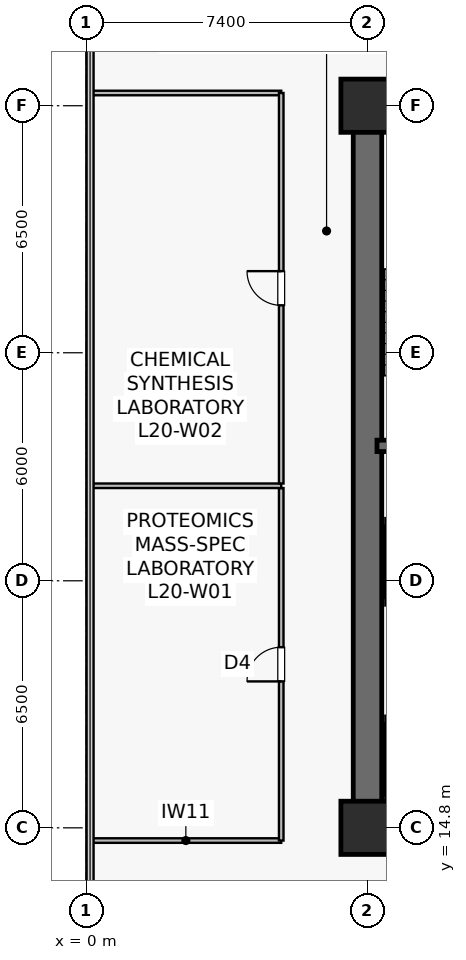
"""IFC4 building model, lengths in metres.
Left out: names, types, materials, properties, quantities, classifications, styles, units other than length and angle.
Written with IfcOpenShell. Run it as: python <this file> out.ifc"""

import sys

from ifc_helpers import new_model, si_unit, direction, frame, frame_2d, origin, origin_2d, place, context, subcontext, project, spatial, rectangle, extrude, source, transform, mapped, element, fill, save


model = new_model("IFC4")
c1 = context("Model", 3, precision=1e-05, world=origin(), true_north=direction((0.0, 1.0)))
c2 = subcontext(c1, "Body", "Model", "MODEL_VIEW")
j1 = project(units=[si_unit("LENGTHUNIT", "METRE"), si_unit("PLANEANGLEUNIT", "RADIAN")], contexts=[c1])
p1 = place(None, origin())
s1 = spatial("IfcSite", under=j1, at=p1, CompositionType="ELEMENT")
p2 = place(p1, origin())
s2 = spatial("IfcBuilding", under=s1, at=p2, CompositionType="ELEMENT")
p3 = place(p2, frame((0.0, 0.0, 82.6)))
s3 = spatial("IfcBuildingStorey", under=s2, at=p3, CompositionType="ELEMENT", Elevation=82.6)
p4 = place(p3, frame((7.025, 14.8, 0.0), z_axis=(0.0, 0.0, 1.0), x_axis=(1.0, 0.0, 0.0)))
e1 = element("IfcWall", 1, at=p4, inside=s3, PredefinedType="SHEAR", context=c2, shape_type="SweptSolid", body=[
    extrude(rectangle(XDim=15.55, YDim=0.75, at=frame_2d((7.775, 0.0))), origin(), (0.0, 0.0, 1.0), 3.78),
])
p5 = place(p3, frame((7.025, 33.8, 0.0), z_axis=(0.0, 0.0, 1.0), x_axis=(1.0, 0.0, 0.0)))
e2 = element("IfcWall", 2, at=p5, inside=s3, PredefinedType="SHEAR", context=c2, shape_type="SweptSolid", body=[
    extrude(rectangle(XDim=15.55, YDim=0.75, at=frame_2d((7.775, 0.0))), origin(), (0.0, 0.0, 1.0), 3.78),
])
p6 = place(p5, frame((5.3, 0.0, 0.0)))
e3 = element("IfcOpeningElement", 3, at=p6, cuts=e2, PredefinedType="OPENING", context=c2, shape_type="SweptSolid", body=[
    extrude(rectangle(XDim=0.95, YDim=2.15, at=frame_2d((0.475, 1.075))), frame((0.0, 0.385, 0.0), z_axis=(0.0, -1.0, 0.0), x_axis=(1.0, 0.0, 0.0)), (0.0, 0.0, 1.0), 0.77),
])
p7 = place(p5, frame((7.815, 0.0, 0.0)))
e4 = element("IfcOpeningElement", 4, at=p7, cuts=e2, PredefinedType="OPENING", context=c2, shape_type="SweptSolid", body=[
    extrude(rectangle(XDim=0.95, YDim=2.15, at=frame_2d((0.475, 1.075))), frame((0.0, 0.385, 0.0), z_axis=(0.0, -1.0, 0.0), x_axis=(1.0, 0.0, 0.0)), (0.0, 0.0, 1.0), 0.77),
])
p8 = place(p5, frame((10.365, 0.0, 0.0)))
e5 = element("IfcOpeningElement", 5, at=p8, cuts=e2, PredefinedType="OPENING", context=c2, shape_type="SweptSolid", body=[
    extrude(rectangle(XDim=0.95, YDim=2.15, at=frame_2d((0.475, 1.075))), frame((0.0, 0.385, 0.0), z_axis=(0.0, -1.0, 0.0), x_axis=(1.0, 0.0, 0.0)), (0.0, 0.0, 1.0), 0.77),
])
p9 = place(p5, frame((12.915, 0.0, 0.0)))
e6 = element("IfcOpeningElement", 6, at=p9, cuts=e2, PredefinedType="OPENING", context=c2, shape_type="SweptSolid", body=[
    extrude(rectangle(XDim=0.95, YDim=2.15, at=frame_2d((0.475, 1.075))), frame((0.0, 0.385, 0.0), z_axis=(0.0, -1.0, 0.0), x_axis=(1.0, 0.0, 0.0)), (0.0, 0.0, 1.0), 0.77),
])
p10 = place(p3, frame((7.4, 15.175, 0.0), z_axis=(0.0, 0.0, 1.0), x_axis=(0.0, 1.0, 0.0)))
e7 = element("IfcWall", 7, at=p10, inside=s3, PredefinedType="SHEAR", context=c2, shape_type="SweptSolid", body=[
    extrude(rectangle(XDim=18.25, YDim=0.75, at=frame_2d((9.125, 0.0))), origin(), (0.0, 0.0, 1.0), 3.78),
])
p11 = place(p3, frame((7.65, 24.85, 0.0), z_axis=(0.0, 0.0, 1.0), x_axis=(1.0, 0.0, 0.0)))
e8 = element("IfcWall", 8, at=p11, inside=s3, PredefinedType="SHEAR", context=c2, shape_type="SweptSolid", body=[
    extrude(rectangle(XDim=3.8, YDim=0.3, at=frame_2d((1.9, 0.0))), origin(), (0.0, 0.0, 1.0), 3.78),
])
p12 = place(p3, frame((7.73, 33.4, 0.0), z_axis=(0.0, 0.0, 1.0), x_axis=(1.0, 0.0, 0.0)))
e9 = element("IfcWall", 9, at=p12, inside=s3, PredefinedType="SOLIDWALL", context=c2, shape_type="SweptSolid", body=[
    extrude(rectangle(XDim=3.72, YDim=0.12, at=frame_2d((1.86, 0.0))), origin(), (0.0, 0.0, 1.0), 3.78),
])
m1 = source(origin(), c2, "Body", "SweptSolid", [
    extrude(rectangle(XDim=1.4, YDim=1.4, at=origin_2d()), origin(), (0.0, 0.0, 1.0), 4.1),
])
for number, where, z_axis, x_axis in (
    (10, (7.4, 14.8, 0.0), (0.0, 0.0, 1.0), (1.0, 0.0, 0.0)),
    (11, (7.4, 33.8, 0.0), (0.0, 0.0, 1.0), (1.0, 0.0, 0.0)),
):
    element("IfcColumn", number, at=place(p3, frame(where, z_axis=z_axis, x_axis=x_axis)), inside=s3, PredefinedType="COLUMN", context=c2, shape_type="MappedRepresentation", body=[
        mapped(m1, transform((0.0, 0.0, 0.0), scale=1.0)),
    ])
p13 = place(p3, frame((7.87, 17.65, 0.0), z_axis=(0.0, 0.0, 1.0), x_axis=(1.0, 0.0, 0.0)))
e12 = element("IfcWall", 12, at=p13, inside=s3, PredefinedType="SOLIDWALL", context=c2, shape_type="SweptSolid", body=[
    extrude(rectangle(XDim=2.26, YDim=0.2, at=frame_2d((1.13, 0.0))), origin(), (0.0, 0.0, 1.0), 3.78),
])
p14 = place(p13, frame((0.58, 0.0, 0.0)))
e13 = element("IfcOpeningElement", 13, at=p14, cuts=e12, PredefinedType="OPENING", context=c2, shape_type="SweptSolid", body=[
    extrude(rectangle(XDim=1.1, YDim=2.22, at=frame_2d((0.55, 1.11))), frame((0.0, 0.11, 0.0), z_axis=(0.0, -1.0, 0.0), x_axis=(1.0, 0.0, 0.0)), (0.0, 0.0, 1.0), 0.22),
])
p15 = place(p3, frame((7.87, 15.55, 0.0), z_axis=(0.0, 0.0, 1.0), x_axis=(1.0, 0.0, 0.0)))
e14 = element("IfcWall", 14, at=p15, inside=s3, PredefinedType="SOLIDWALL", context=c2, shape_type="SweptSolid", body=[
    extrude(rectangle(XDim=2.26, YDim=0.2, at=frame_2d((1.13, 0.0))), origin(), (0.0, 0.0, 1.0), 3.78),
])
p16 = place(p3, frame((7.95, 15.65, 0.0), z_axis=(0.0, 0.0, 1.0), x_axis=(0.0, 1.0, 0.0)))
e15 = element("IfcWall", 15, at=p16, inside=s3, PredefinedType="SOLIDWALL", context=c2, shape_type="SweptSolid", body=[
    extrude(rectangle(XDim=1.9, YDim=0.18, at=frame_2d((0.95, 0.0))), origin(), (0.0, 0.0, 1.0), 3.78),
])
for number, where, z_axis, x_axis in (
    (16, (7.87, 20.75, 0.0), (0.0, 0.0, 1.0), (1.0, 0.0, 0.0)),
    (17, (7.87, 22.85, 0.0), (0.0, 0.0, 1.0), (1.0, 0.0, 0.0)),
):
    element("IfcWall", number, at=place(p3, frame(where, z_axis=z_axis, x_axis=x_axis)), inside=s3, PredefinedType="SOLIDWALL", context=c2, shape_type="SweptSolid", body=[
        extrude(rectangle(XDim=2.26, YDim=0.2, at=frame_2d((1.13, 0.0))), origin(), (0.0, 0.0, 1.0), 3.78),
    ])
p17 = place(p3, frame((7.95, 20.85, 0.0), z_axis=(0.0, 0.0, 1.0), x_axis=(0.0, 1.0, 0.0)))
e18 = element("IfcWall", 18, at=p17, inside=s3, PredefinedType="SOLIDWALL", context=c2, shape_type="SweptSolid", body=[
    extrude(rectangle(XDim=1.9, YDim=0.18, at=frame_2d((0.95, 0.0))), origin(), (0.0, 0.0, 1.0), 3.78),
])
for number, where, z_axis, x_axis in (
    (19, (0.11, 14.465, 0.0), (0.0, 0.0, 1.0), (1.0, 0.0, 0.0)),
    (20, (0.11, 34.135, 0.0), (0.0, 0.0, 1.0), (1.0, 0.0, 0.0)),
):
    element("IfcWall", number, at=place(p3, frame(where, z_axis=z_axis, x_axis=x_axis)), inside=s3, PredefinedType="PARTITIONING", context=c2, shape_type="SweptSolid", body=[
        extrude(rectangle(XDim=5.02, YDim=0.12, at=frame_2d((2.51, 0.0))), origin(), (0.0, 0.0, 1.0), 3.78),
    ])
p18 = place(p3, frame((5.13, 14.465, 0.0), z_axis=(0.0, 0.0, 1.0), x_axis=(0.0, 1.0, 0.0)))
e21 = element("IfcWall", 21, at=p18, inside=s3, PredefinedType="PARTITIONING", context=c2, shape_type="SweptSolid", body=[
    extrude(rectangle(XDim=9.275, YDim=0.12, at=frame_2d((4.637, 0.0))), origin(), (0.0, 0.0, 1.0), 3.78),
])
p19 = place(p18, frame((4.188, 0.0, 0.0)))
e22 = element("IfcOpeningElement", 22, at=p19, cuts=e21, PredefinedType="OPENING", context=c2, shape_type="SweptSolid", body=[
    extrude(rectangle(XDim=0.9, YDim=2.1, at=frame_2d((0.45, 1.05))), frame((0.0, 0.07, 0.0), z_axis=(0.0, -1.0, 0.0), x_axis=(1.0, 0.0, 0.0)), (0.0, 0.0, 1.0), 0.14),
])
p20 = place(p3, frame((0.11, 23.8, 0.0), z_axis=(0.0, 0.0, 1.0), x_axis=(1.0, 0.0, 0.0)))
e23 = element("IfcWall", 23, at=p20, inside=s3, PredefinedType="PARTITIONING", context=c2, shape_type="SweptSolid", body=[
    extrude(rectangle(XDim=5.02, YDim=0.12, at=frame_2d((2.51, 0.0))), origin(), (0.0, 0.0, 1.0), 3.78),
])
p21 = place(p3, frame((5.13, 23.86, 0.0), z_axis=(0.0, 0.0, 1.0), x_axis=(0.0, 1.0, 0.0)))
e24 = element("IfcWall", 24, at=p21, inside=s3, PredefinedType="PARTITIONING", context=c2, shape_type="SweptSolid", body=[
    extrude(rectangle(XDim=10.275, YDim=0.12, at=frame_2d((5.137, 0.0))), origin(), (0.0, 0.0, 1.0), 3.78),
])
p22 = place(p21, frame((4.688, 0.0, 0.0)))
e25 = element("IfcOpeningElement", 25, at=p22, cuts=e24, PredefinedType="OPENING", context=c2, shape_type="SweptSolid", body=[
    extrude(rectangle(XDim=0.9, YDim=2.1, at=frame_2d((0.45, 1.05))), frame((0.0, 0.07, 0.0), z_axis=(0.0, -1.0, 0.0), x_axis=(1.0, 0.0, 0.0)), (0.0, 0.0, 1.0), 0.14),
])
m2 = source(origin(), c2, "Body", "SweptSolid", [
    extrude(rectangle(XDim=0.9, YDim=2.1, at=frame_2d((0.45, 1.05))), frame((0.0, 0.025, 0.0), z_axis=(0.0, -1.0, 0.0), x_axis=(1.0, 0.0, 0.0)), (0.0, 0.0, 1.0), 0.05),
])
p23 = place(p19, origin())
e26 = element("IfcDoor", 26, at=p23, inside=s3, OperationType="SINGLE_SWING_LEFT", PredefinedType="DOOR", context=c2, shape_type="MappedRepresentation", body=[
    mapped(m2, transform((0.0, 0.0, 0.0), scale=1.0)),
])
fill(e22, e26)
p24 = place(p22, origin())
e27 = element("IfcDoor", 27, at=p24, inside=s3, OperationType="SINGLE_SWING_RIGHT", PredefinedType="DOOR", context=c2, shape_type="MappedRepresentation", body=[
    mapped(m2, transform((0.0, 0.0, 0.0), scale=1.0)),
])
fill(e25, e27)
save(model, sys.argv[1])
